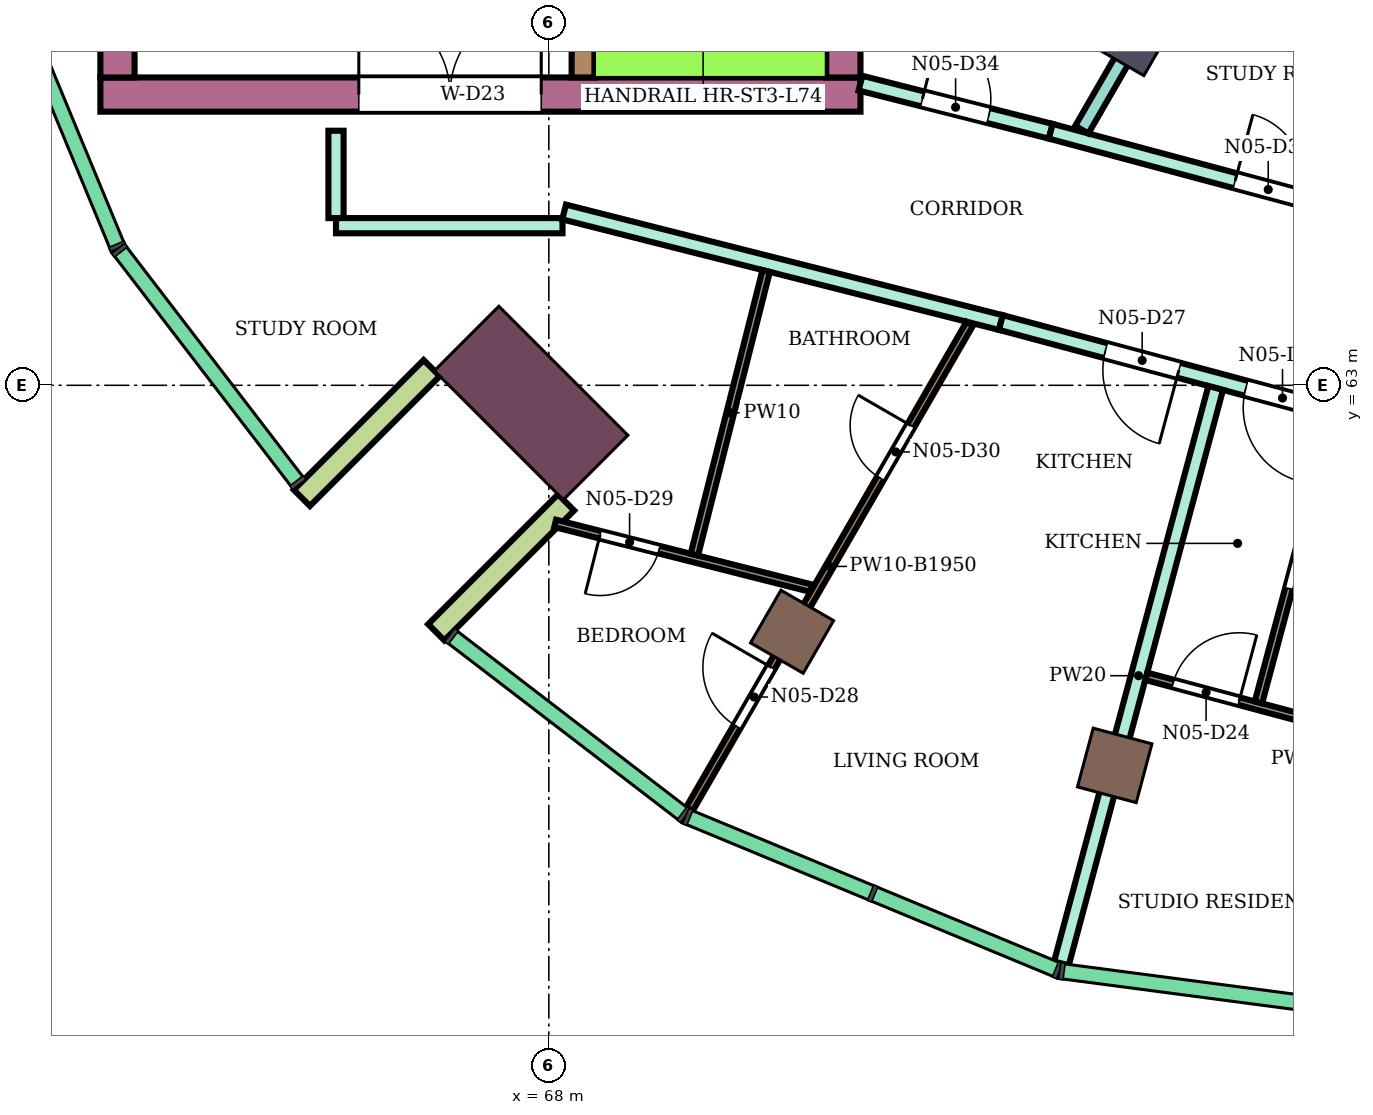
"""IFC4 building model, lengths in metres.
Left out: names, types, materials, properties, quantities, classifications, styles, units other than length and angle.
Written with IfcOpenShell. Run it as: python <this file> out.ifc"""

import sys

from ifc_helpers import new_model, si_unit, direction, frame, frame_2d, origin, origin_2d, place, context, subcontext, project, spatial, rectangle, extrude, element, fill, save


model = new_model("IFC4")
c1 = context("Model", 3, precision=1e-05, world=origin(), true_north=direction((0.0, 1.0)))
c2 = subcontext(c1, "Body", "Model", "MODEL_VIEW")
j1 = project(units=[si_unit("LENGTHUNIT", "METRE"), si_unit("PLANEANGLEUNIT", "RADIAN")], contexts=[c1])
p1 = place(None, origin())
s1 = spatial("IfcSite", under=j1, at=p1, CompositionType="ELEMENT")
p2 = place(p1, origin())
s2 = spatial("IfcBuilding", under=s1, at=p2, CompositionType="ELEMENT")
p3 = place(p2, frame((0.0, 0.0, 323.7)))
s3 = spatial("IfcBuildingStorey", under=s2, at=p3, CompositionType="ELEMENT", Elevation=323.7)
for number, where, z_axis, x_axis in (
    (1, (71.2, 59.758, 0.0), (0.0, 0.0, 1.0), (-0.5, -0.866, 0.0)),
    (2, (75.445, 58.0, 0.0), (0.0, 0.0, 1.0), (-0.259, -0.966, 0.0)),
):
    element("IfcColumn", number, at=place(p3, frame(where, z_axis=z_axis, x_axis=x_axis)), inside=s3, PredefinedType="COLUMN", context=c2, shape_type="SweptSolid", body=[
        extrude(rectangle(XDim=0.8, YDim=0.8, at=origin_2d()), origin(), (0.0, 0.0, 1.0), 4.4),
    ])
p4 = place(p3, frame((75.7, 67.552, 0.0), z_axis=(0.0, 0.0, 1.0), x_axis=(-0.5, -0.866025403784, 0.0)))
e3 = element("IfcColumn", 3, at=p4, inside=s3, PredefinedType="COLUMN", context=c2, shape_type="SweptSolid", body=[
    extrude(rectangle(XDim=0.7, YDim=0.7, at=origin_2d()), origin(), (0.0, 0.0, 1.0), 4.4),
])
p5 = place(p3, frame((67.767, 62.767, 0.0), z_axis=(0.0, 0.0, 1.0), x_axis=(-0.707106781187, -0.707106781187, 0.0)))
e4 = element("IfcColumn", 4, at=p5, inside=s3, PredefinedType="COLUMN", context=c2, shape_type="SweptSolid", body=[
    extrude(rectangle(XDim=1.2, YDim=2.4, at=origin_2d()), origin(), (0.0, 0.0, 1.0), 4.4),
])
p6 = place(p3, frame((72.1, 66.825, 0.0), z_axis=(0.0, 0.0, 1.0), x_axis=(-1.0, 0.0, 0.0)))
e5 = element("IfcWall", 5, at=p6, inside=s3, PredefinedType="SHEAR", context=c2, shape_type="SweptSolid", body=[
    extrude(rectangle(XDim=10.0, YDim=0.45, at=frame_2d((5.0, 0.0))), origin(), (0.0, 0.0, 1.0), 4.05),
])
p7 = place(p6, frame((4.2, 0.0, 0.0)))
e6 = element("IfcOpeningElement", 6, at=p7, cuts=e5, PredefinedType="OPENING", context=c2, shape_type="SweptSolid", body=[
    extrude(rectangle(XDim=2.4, YDim=2.4, at=frame_2d((1.2, 1.2))), frame((0.0, 0.235, 0.0), z_axis=(0.0, -1.0, 0.0), x_axis=(1.0, 0.0, 0.0)), (0.0, 0.0, 1.0), 0.47),
])
p8 = place(p3, frame((71.875, 75.0, 0.0), z_axis=(0.0, 0.0, 1.0), x_axis=(0.0, -1.0, 0.0)))
e7 = element("IfcWall", 7, at=p8, inside=s3, PredefinedType="SHEAR", context=c2, shape_type="SweptSolid", body=[
    extrude(rectangle(XDim=7.95, YDim=0.45, at=frame_2d((3.975, 0.0))), origin(), (0.0, 0.0, 1.0), 4.05),
])
p9 = place(p3, frame((62.325, 76.4, 0.0), z_axis=(0.0, 0.0, 1.0), x_axis=(0.0, -1.0, 0.0)))
e8 = element("IfcWall", 8, at=p9, inside=s3, PredefinedType="SHEAR", context=c2, shape_type="SweptSolid", body=[
    extrude(rectangle(XDim=9.35, YDim=0.45, at=frame_2d((4.675, 0.0))), origin(), (0.0, 0.0, 1.0), 4.05),
])
p10 = place(p3, frame((68.45, 75.0, 0.0), z_axis=(0.0, 0.0, 1.0), x_axis=(0.0, -1.0, 0.0)))
e9 = element("IfcWall", 9, at=p10, inside=s3, PredefinedType="SHEAR", context=c2, shape_type="SweptSolid", body=[
    extrude(rectangle(XDim=7.95, YDim=0.3, at=frame_2d((3.975, 0.0))), origin(), (0.0, 0.0, 1.0), 4.05),
])
p11 = place(p10, frame((1.85, 0.0, 0.0)))
e10 = element("IfcOpeningElement", 10, at=p11, cuts=e9, PredefinedType="OPENING", context=c2, shape_type="SweptSolid", body=[
    extrude(rectangle(XDim=0.9, YDim=2.1, at=frame_2d((0.45, 1.05))), frame((0.0, 0.16, 0.0), z_axis=(0.0, -1.0, 0.0), x_axis=(1.0, 0.0, 0.0)), (0.0, 0.0, 1.0), 0.32),
])
for number, where, z_axis, x_axis in (
    (11, (66.459, 63.227, 0.0), (0.0, 0.0, 1.0), (-0.707, -0.707, 0.0)),
    (12, (68.227, 61.459, 0.0), (0.0, 0.0, 1.0), (-0.707, -0.707, 0.0)),
):
    element("IfcWall", number, at=place(p3, frame(where, z_axis=z_axis, x_axis=x_axis)), inside=s3, PredefinedType="NOTDEFINED", context=c2, shape_type="SweptSolid", body=[
        extrude(rectangle(XDim=2.416, YDim=0.3, at=frame_2d((1.208, 0.0))), origin(), (0.0, 0.0, 1.0), 4.4),
    ])
p12 = place(p3, frame((76.198, 68.415, 0.0), z_axis=(0.0, 0.0, 1.0), x_axis=(0.965933654434, -0.258789828301, 0.0)))
e13 = element("IfcWall", 13, at=p12, inside=s3, PredefinedType="NOTDEFINED", context=c2, shape_type="SweptSolid", body=[
    extrude(rectangle(XDim=3.936, YDim=0.2, at=frame_2d((1.968, 0.0))), origin(), (0.0, 0.0, 1.0), 4.4),
])
p13 = place(p12, frame((0.468, 0.0, 0.9)))
e14 = element("IfcOpeningElement", 14, at=p13, cuts=e13, PredefinedType="OPENING", context=c2, shape_type="SweptSolid", body=[
    extrude(rectangle(XDim=3.0, YDim=2.3, at=frame_2d((1.5, 1.15))), frame((0.0, 0.11, 0.0), z_axis=(0.0, -1.0, 0.0), x_axis=(1.0, 0.0, 0.0)), (0.0, 0.0, 1.0), 0.22),
])
p14 = place(p3, frame((65.2, 65.2, 0.0), z_axis=(0.0, 0.0, 1.0), x_axis=(0.0, 1.0, 0.0)))
e15 = element("IfcWall", 15, at=p14, inside=s3, PredefinedType="PARTITIONING", context=c2, shape_type="SweptSolid", body=[
    extrude(rectangle(XDim=1.149, YDim=0.2, at=frame_2d((0.575, 0.0))), origin(), (0.0, 0.0, 1.0), 3.95),
])
p15 = place(p3, frame((65.2, 65.1, 0.0), z_axis=(0.0, 0.0, 1.0), x_axis=(1.0, 0.0, 0.0)))
e16 = element("IfcWall", 16, at=p15, inside=s3, PredefinedType="PARTITIONING", context=c2, shape_type="SweptSolid", body=[
    extrude(rectangle(XDim=2.98, YDim=0.2, at=frame_2d((1.49, 0.0))), origin(), (0.0, 0.0, 1.0), 3.95),
])
p16 = place(p3, frame((68.201, 65.28, 0.0), z_axis=(0.0, 0.0, 1.0), x_axis=(0.969421088032, -0.245403247897, 0.0)))
e17 = element("IfcWall", 17, at=p16, inside=s3, PredefinedType="PARTITIONING", context=c2, shape_type="SweptSolid", body=[
    extrude(rectangle(XDim=5.927, YDim=0.2, at=frame_2d((2.964, 0.0))), origin(), (0.0, 0.0, 1.0), 3.95),
])
p17 = place(p3, frame((72.1, 66.975, 0.0), z_axis=(0.0, 0.0, 1.0), x_axis=(0.969471314457, -0.245204752086, 0.0)))
e18 = element("IfcWall", 18, at=p17, inside=s3, PredefinedType="PARTITIONING", context=c2, shape_type="SweptSolid", body=[
    extrude(rectangle(XDim=2.582, YDim=0.2, at=frame_2d((1.291, 0.0))), origin(), (0.0, 0.0, 1.0), 3.95),
])
p18 = place(p17, frame((0.841, 0.0, 0.0)))
e19 = element("IfcOpeningElement", 19, at=p18, cuts=e18, PredefinedType="OPENING", context=c2, shape_type="SweptSolid", body=[
    extrude(rectangle(XDim=0.9, YDim=2.1, at=frame_2d((0.45, 1.05))), frame((0.0, 0.11, 0.0), z_axis=(0.0, -1.0, 0.0), x_axis=(1.0, 0.0, 0.0)), (0.0, 0.0, 1.0), 0.22),
])
p19 = place(p3, frame((73.947, 63.826, 0.0), z_axis=(0.0, 0.0, 1.0), x_axis=(0.965894934009, -0.25893430915, 0.0)))
e20 = element("IfcWall", 20, at=p19, inside=s3, PredefinedType="PARTITIONING", context=c2, shape_type="SweptSolid", body=[
    extrude(rectangle(XDim=6.177, YDim=0.2, at=frame_2d((3.088, 0.0))), origin(), (0.0, 0.0, 1.0), 3.95),
])
p20 = place(p19, frame((3.336, 0.0, 0.0)))
e21 = element("IfcOpeningElement", 21, at=p20, cuts=e20, PredefinedType="OPENING", context=c2, shape_type="SweptSolid", body=[
    extrude(rectangle(XDim=1.0, YDim=2.1, at=frame_2d((0.5, 1.05))), frame((0.0, 0.11, 0.0), z_axis=(0.0, -1.0, 0.0), x_axis=(1.0, 0.0, 0.0)), (0.0, 0.0, 1.0), 0.22),
])
p21 = place(p19, frame((1.424, 0.0, 0.0)))
e22 = element("IfcOpeningElement", 22, at=p21, cuts=e20, PredefinedType="OPENING", context=c2, shape_type="SweptSolid", body=[
    extrude(rectangle(XDim=1.0, YDim=2.1, at=frame_2d((0.5, 1.05))), frame((0.0, 0.11, 0.0), z_axis=(0.0, -1.0, 0.0), x_axis=(1.0, 0.0, 0.0)), (0.0, 0.0, 1.0), 0.22),
])
p22 = place(p3, frame((74.603, 66.342, 0.0), z_axis=(0.0, 0.0, 1.0), x_axis=(0.965920893652, -0.258837453254, 0.0)))
e23 = element("IfcWall", 23, at=p22, inside=s3, PredefinedType="PARTITIONING", context=c2, shape_type="SweptSolid", body=[
    extrude(rectangle(XDim=5.458, YDim=0.2, at=frame_2d((2.729, 0.0))), origin(), (0.0, 0.0, 1.0), 3.95),
])
p23 = place(p22, frame((2.512, 0.0, 0.0)))
e24 = element("IfcOpeningElement", 24, at=p23, cuts=e23, PredefinedType="OPENING", context=c2, shape_type="SweptSolid", body=[
    extrude(rectangle(XDim=0.9, YDim=2.1, at=frame_2d((0.45, 1.05))), frame((0.0, 0.11, 0.0), z_axis=(0.0, -1.0, 0.0), x_axis=(1.0, 0.0, 0.0)), (0.0, 0.0, 1.0), 0.22),
])
p24 = place(p3, frame((74.743, 55.394, 0.0), z_axis=(0.0, 0.0, 1.0), x_axis=(0.258969103378, 0.965885605802, 0.0)))
e25 = element("IfcWall", 25, at=p24, inside=s3, PredefinedType="PARTITIONING", context=c2, shape_type="SweptSolid", body=[
    extrude(rectangle(XDim=7.838, YDim=0.2, at=frame_2d((3.919, 0.0))), origin(), (0.0, 0.0, 1.0), 3.95),
])
p25 = place(p3, frame((75.012, 66.363, 0.0), z_axis=(0.0, 0.0, 1.0), x_axis=(0.500143511652, 0.865942531438, 0.0)))
e26 = element("IfcWall", 26, at=p25, inside=s3, PredefinedType="PARTITIONING", context=c2, shape_type="SweptSolid", body=[
    extrude(rectangle(XDim=2.275, YDim=0.2, at=frame_2d((1.138, 0.0))), origin(), (0.0, 0.0, 1.0), 2.45),
])
p26 = place(p3, frame((68.083, 61.184, 0.0), z_axis=(0.0, 0.0, 1.0), x_axis=(0.969415105271, -0.245426880503, 0.0)))
e27 = element("IfcWall", 27, at=p26, inside=s3, PredefinedType="PARTITIONING", context=c2, shape_type="SweptSolid", body=[
    extrude(rectangle(XDim=3.476, YDim=0.1, at=frame_2d((1.738, 0.0))), origin(), (0.0, 0.0, 1.0), 3.95),
])
p27 = place(p26, frame((0.61, 0.0, 0.0)))
e28 = element("IfcOpeningElement", 28, at=p27, cuts=e27, PredefinedType="OPENING", context=c2, shape_type="SweptSolid", body=[
    extrude(rectangle(XDim=0.8, YDim=2.1, at=frame_2d((0.4, 1.05))), frame((0.0, 0.06, 0.0), z_axis=(0.0, -1.0, 0.0), x_axis=(1.0, 0.0, 0.0)), (0.0, 0.0, 1.0), 0.12),
])
p28 = place(p3, frame((69.849, 57.424, 0.0), z_axis=(0.0, 0.0, 1.0), x_axis=(0.500112137663, 0.865960651394, 0.0)))
e29 = element("IfcWall", 29, at=p28, inside=s3, PredefinedType="PARTITIONING", context=c2, shape_type="SweptSolid", body=[
    extrude(rectangle(XDim=7.375, YDim=0.1, at=frame_2d((3.688, 0.0))), origin(), (0.0, 0.0, 1.0), 2.45),
])
p29 = place(p28, frame((1.254, 0.0, 0.0)))
e30 = element("IfcOpeningElement", 30, at=p29, cuts=e29, PredefinedType="OPENING", context=c2, shape_type="SweptSolid", body=[
    extrude(rectangle(XDim=0.9, YDim=2.1, at=frame_2d((0.45, 1.05))), frame((0.0, 0.06, 0.0), z_axis=(0.0, -1.0, 0.0), x_axis=(1.0, 0.0, 0.0)), (0.0, 0.0, 1.0), 0.12),
])
p30 = place(p28, frame((5.027, 0.0, 0.0)))
e31 = element("IfcOpeningElement", 31, at=p30, cuts=e29, PredefinedType="OPENING", context=c2, shape_type="SweptSolid", body=[
    extrude(rectangle(XDim=0.8, YDim=2.1, at=frame_2d((0.4, 1.05))), frame((0.0, 0.06, 0.0), z_axis=(0.0, -1.0, 0.0), x_axis=(1.0, 0.0, 0.0)), (0.0, 0.0, 1.0), 0.12),
])
p31 = place(p3, frame((69.914, 60.772, 0.0), z_axis=(0.0, 0.0, 1.0), x_axis=(0.245489008107, 0.969399374303, 0.0)))
e32 = element("IfcWall", 32, at=p31, inside=s3, PredefinedType="PARTITIONING", context=c2, shape_type="SweptSolid", body=[
    extrude(rectangle(XDim=3.85, YDim=0.1, at=frame_2d((1.925, 0.0))), origin(), (0.0, 0.0, 1.0), 3.95),
])
p32 = place(p3, frame((75.862, 59.171, 0.0), z_axis=(0.0, 0.0, 1.0), x_axis=(0.965961623338, -0.258685411723, 0.0)))
e33 = element("IfcWall", 33, at=p32, inside=s3, PredefinedType="PARTITIONING", context=c2, shape_type="SweptSolid", body=[
    extrude(rectangle(XDim=4.174, YDim=0.1, at=frame_2d((2.087, 0.0))), origin(), (0.0, 0.0, 1.0), 3.95),
])
p33 = place(p32, frame((0.363, 0.0, 0.0)))
e34 = element("IfcOpeningElement", 34, at=p33, cuts=e33, PredefinedType="OPENING", context=c2, shape_type="SweptSolid", body=[
    extrude(rectangle(XDim=0.9, YDim=2.1, at=frame_2d((0.45, 1.05))), frame((0.0, 0.06, 0.0), z_axis=(0.0, -1.0, 0.0), x_axis=(1.0, 0.0, 0.0)), (0.0, 0.0, 1.0), 0.12),
])
p34 = place(p3, frame((77.336, 58.828, 0.0), z_axis=(0.0, 0.0, 1.0), x_axis=(0.25872023695, 0.965952296437, 0.0)))
e35 = element("IfcWall", 35, at=p34, inside=s3, PredefinedType="PARTITIONING", context=c2, shape_type="SweptSolid", body=[
    extrude(rectangle(XDim=3.85, YDim=0.1, at=frame_2d((1.925, 0.0))), origin(), (0.0, 0.0, 1.0), 3.95),
])
p35 = place(p34, frame((1.55, 0.0, 0.0)))
e36 = element("IfcOpeningElement", 36, at=p35, cuts=e35, PredefinedType="OPENING", context=c2, shape_type="SweptSolid", body=[
    extrude(rectangle(XDim=0.8, YDim=2.1, at=frame_2d((0.4, 1.05))), frame((0.0, 0.06, 0.0), z_axis=(0.0, -1.0, 0.0), x_axis=(1.0, 0.0, 0.0)), (0.0, 0.0, 1.0), 0.12),
])
p36 = place(p33, origin())
e37 = element("IfcDoor", 37, at=p36, inside=s3, OperationType="SINGLE_SWING_RIGHT", PredefinedType="DOOR", context=c2, shape_type="SweptSolid", body=[
    extrude(rectangle(XDim=0.9, YDim=2.1, at=frame_2d((0.45, 1.05))), frame((0.0, 0.025, 0.0), z_axis=(0.0, -1.0, 0.0), x_axis=(1.0, 0.0, 0.0)), (0.0, 0.0, 1.0), 0.05),
])
fill(e34, e37)
p37 = place(p20, frame((1.0, 0.0, 0.0), z_axis=(0.0, 0.0, 1.0), x_axis=(-1.0, 0.0, 0.0)))
e38 = element("IfcDoor", 38, at=p37, inside=s3, OperationType="SINGLE_SWING_LEFT", PredefinedType="DOOR", context=c2, shape_type="SweptSolid", body=[
    extrude(rectangle(XDim=1.0, YDim=2.1, at=frame_2d((0.5, 1.05))), frame((0.0, 0.025, 0.0), z_axis=(0.0, -1.0, 0.0), x_axis=(1.0, 0.0, 0.0)), (0.0, 0.0, 1.0), 0.05),
])
fill(e21, e38)
p38 = place(p35, frame((0.8, 0.0, 0.0), z_axis=(0.0, 0.0, 1.0), x_axis=(-1.0, 0.0, 0.0)))
e39 = element("IfcDoor", 39, at=p38, inside=s3, OperationType="SINGLE_SWING_LEFT", PredefinedType="DOOR", context=c2, shape_type="SweptSolid", body=[
    extrude(rectangle(XDim=0.8, YDim=2.1, at=frame_2d((0.4, 1.05))), frame((0.0, 0.025, 0.0), z_axis=(0.0, -1.0, 0.0), x_axis=(1.0, 0.0, 0.0)), (0.0, 0.0, 1.0), 0.05),
])
fill(e36, e39)
p39 = place(p21, frame((1.0, 0.0, 0.0), z_axis=(0.0, 0.0, 1.0), x_axis=(-1.0, 0.0, 0.0)))
e40 = element("IfcDoor", 40, at=p39, inside=s3, OperationType="SINGLE_SWING_LEFT", PredefinedType="DOOR", context=c2, shape_type="SweptSolid", body=[
    extrude(rectangle(XDim=1.0, YDim=2.1, at=frame_2d((0.5, 1.05))), frame((0.0, 0.025, 0.0), z_axis=(0.0, -1.0, 0.0), x_axis=(1.0, 0.0, 0.0)), (0.0, 0.0, 1.0), 0.05),
])
fill(e22, e40)
p40 = place(p29, origin())
e41 = element("IfcDoor", 41, at=p40, inside=s3, OperationType="SINGLE_SWING_RIGHT", PredefinedType="DOOR", context=c2, shape_type="SweptSolid", body=[
    extrude(rectangle(XDim=0.9, YDim=2.1, at=frame_2d((0.45, 1.05))), frame((0.0, 0.025, 0.0), z_axis=(0.0, -1.0, 0.0), x_axis=(1.0, 0.0, 0.0)), (0.0, 0.0, 1.0), 0.05),
])
fill(e30, e41)
p41 = place(p27, frame((0.8, 0.0, 0.0), z_axis=(0.0, 0.0, 1.0), x_axis=(-1.0, 0.0, 0.0)))
e42 = element("IfcDoor", 42, at=p41, inside=s3, OperationType="SINGLE_SWING_RIGHT", PredefinedType="DOOR", context=c2, shape_type="SweptSolid", body=[
    extrude(rectangle(XDim=0.8, YDim=2.1, at=frame_2d((0.4, 1.05))), frame((0.0, 0.025, 0.0), z_axis=(0.0, -1.0, 0.0), x_axis=(1.0, 0.0, 0.0)), (0.0, 0.0, 1.0), 0.05),
])
fill(e28, e42)
p42 = place(p30, origin())
e43 = element("IfcDoor", 43, at=p42, inside=s3, OperationType="SINGLE_SWING_RIGHT", PredefinedType="DOOR", context=c2, shape_type="SweptSolid", body=[
    extrude(rectangle(XDim=0.8, YDim=2.1, at=frame_2d((0.4, 1.05))), frame((0.0, 0.025, 0.0), z_axis=(0.0, -1.0, 0.0), x_axis=(1.0, 0.0, 0.0)), (0.0, 0.0, 1.0), 0.05),
])
fill(e31, e43)
p43 = place(p23, origin())
e44 = element("IfcDoor", 44, at=p43, inside=s3, OperationType="SINGLE_SWING_LEFT", PredefinedType="DOOR", context=c2, shape_type="SweptSolid", body=[
    extrude(rectangle(XDim=0.9, YDim=2.1, at=frame_2d((0.45, 1.05))), frame((0.0, 0.025, 0.0), z_axis=(0.0, -1.0, 0.0), x_axis=(1.0, 0.0, 0.0)), (0.0, 0.0, 1.0), 0.05),
])
fill(e24, e44)
p44 = place(p18, origin())
e45 = element("IfcDoor", 45, at=p44, inside=s3, OperationType="SINGLE_SWING_LEFT", PredefinedType="DOOR", context=c2, shape_type="SweptSolid", body=[
    extrude(rectangle(XDim=0.9, YDim=2.1, at=frame_2d((0.45, 1.05))), frame((0.0, 0.025, 0.0), z_axis=(0.0, -1.0, 0.0), x_axis=(1.0, 0.0, 0.0)), (0.0, 0.0, 1.0), 0.05),
])
fill(e19, e45)
p45 = place(p7, frame((2.4, 0.0, 0.0), z_axis=(0.0, 0.0, 1.0), x_axis=(-1.0, 0.0, 0.0)))
e46 = element("IfcDoor", 46, at=p45, inside=s3, OperationType="DOUBLE_DOOR_SINGLE_SWING", PredefinedType="DOOR", context=c2, shape_type="SweptSolid", body=[
    extrude(rectangle(XDim=2.4, YDim=2.4, at=frame_2d((1.2, 1.2))), frame((0.0, 0.025, 0.0), z_axis=(0.0, -1.0, 0.0), x_axis=(1.0, 0.0, 0.0)), (0.0, 0.0, 1.0), 0.05),
])
fill(e6, e46)
save(model, sys.argv[1])
